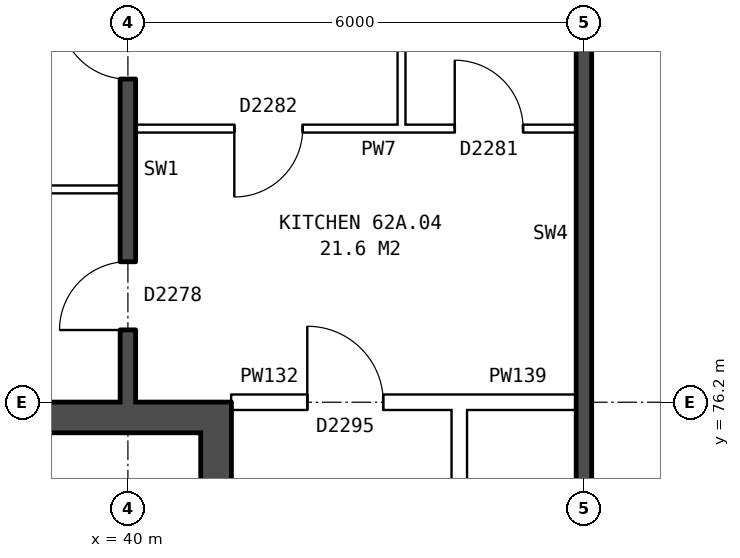
"""IFC4 building model, lengths in metres.
Left out: names, types, materials, properties, quantities, classifications, styles, units other than length and angle.
Written with IfcOpenShell. Run it as: python <this file> out.ifc"""

import sys

from ifc_helpers import new_model, si_unit, direction, frame, frame_2d, origin, place, context, subcontext, project, spatial, rectangle, extrude, element, fill, save


model = new_model("IFC4")
c1 = context("Model", 3, precision=1e-05, world=origin(), true_north=direction((0.0, 1.0)))
c2 = subcontext(c1, "Body", "Model", "MODEL_VIEW")
j1 = project(units=[si_unit("LENGTHUNIT", "METRE"), si_unit("PLANEANGLEUNIT", "RADIAN")], contexts=[c1])
p1 = place(None, origin())
s1 = spatial("IfcSite", under=j1, at=p1, CompositionType="ELEMENT")
p2 = place(p1, origin())
s2 = spatial("IfcBuilding", under=s1, at=p2, CompositionType="ELEMENT")
p3 = place(p2, frame((0.0, 0.0, 221.4)))
s3 = spatial("IfcBuildingStorey", under=s2, at=p3, CompositionType="ELEMENT", Elevation=221.4)
p4 = place(p3, frame((41.16, 76.2, 0.0), z_axis=(0.0, 0.0, 1.0), x_axis=(0.0, -1.0, 0.0)))
e1 = element("IfcWall", 1, at=p4, inside=s3, PredefinedType="SHEAR", context=c2, shape_type="SweptSolid", body=[
    extrude(rectangle(XDim=12.4, YDim=0.4, at=frame_2d((6.2, 0.0))), origin(), (0.0, 0.0, 1.0), 2.85),
])
p5 = place(p4, frame((1.325, 0.0, 0.0)))
e2 = element("IfcOpeningElement", 2, at=p5, cuts=e1, PredefinedType="OPENING", context=c2, shape_type="SweptSolid", body=[
    extrude(rectangle(XDim=1.1, YDim=2.1, at=frame_2d((0.55, 1.05))), frame((0.0, 0.21, 0.0), z_axis=(0.0, -1.0, 0.0), x_axis=(1.0, 0.0, 0.0)), (0.0, 0.0, 1.0), 0.42),
])
p6 = place(p4, frame((5.925, 0.0, 0.0)))
e3 = element("IfcOpeningElement", 3, at=p6, cuts=e1, PredefinedType="OPENING", context=c2, shape_type="SweptSolid", body=[
    extrude(rectangle(XDim=0.85, YDim=2.1, at=frame_2d((0.425, 1.05))), frame((0.0, 0.21, 0.0), z_axis=(0.0, -1.0, 0.0), x_axis=(1.0, 0.0, 0.0)), (0.0, 0.0, 1.0), 0.42),
])
p7 = place(p4, frame((9.9, 0.0, 0.0)))
e4 = element("IfcOpeningElement", 4, at=p7, cuts=e1, PredefinedType="OPENING", context=c2, shape_type="SweptSolid", body=[
    extrude(rectangle(XDim=1.1, YDim=2.1, at=frame_2d((0.55, 1.05))), frame((0.0, 0.21, 0.0), z_axis=(0.0, -1.0, 0.0), x_axis=(1.0, 0.0, 0.0)), (0.0, 0.0, 1.0), 0.42),
])
p8 = place(p3, frame((40.96, 76.0, 0.0), z_axis=(0.0, 0.0, 1.0), x_axis=(-1.0, 0.0, 0.0)))
e5 = element("IfcWall", 5, at=p8, inside=s3, PredefinedType="SHEAR", context=c2, shape_type="SweptSolid", body=[
    extrude(rectangle(XDim=8.2, YDim=0.4, at=frame_2d((4.1, 0.0))), origin(), (0.0, 0.0, 1.0), 2.85),
])
p9 = place(p3, frame((44.36, 63.9, 0.0), z_axis=(0.0, 0.0, 1.0), x_axis=(0.0, 1.0, 0.0)))
e6 = element("IfcWall", 6, at=p9, inside=s3, PredefinedType="PARTITIONING", context=c2, shape_type="SweptSolid", body=[
    extrude(rectangle(XDim=12.2, YDim=0.2, at=frame_2d((6.1, 0.0))), origin(), (0.0, 0.0, 1.0), 2.85),
])
p10 = place(p9, frame((5.1, 0.0, 0.0)))
e7 = element("IfcOpeningElement", 7, at=p10, cuts=e6, PredefinedType="OPENING", context=c2, shape_type="SweptSolid", body=[
    extrude(rectangle(XDim=2.0, YDim=2.1, at=frame_2d((1.0, 1.05))), frame((0.0, 0.11, 0.0), z_axis=(0.0, -1.0, 0.0), x_axis=(1.0, 0.0, 0.0)), (0.0, 0.0, 1.0), 0.22),
])
p11 = place(p3, frame((41.36, 76.2, 0.0), z_axis=(0.0, 0.0, 1.0), x_axis=(1.0, 0.0, 0.0)))
e8 = element("IfcWall", 8, at=p11, inside=s3, PredefinedType="PARTITIONING", context=c2, shape_type="SweptSolid", body=[
    extrude(rectangle(XDim=3.0, YDim=0.2, at=frame_2d((1.5, 0.0))), origin(), (0.0, 0.0, 1.0), 2.85),
])
p12 = place(p11, frame((1.0, 0.0, 0.0)))
e9 = element("IfcOpeningElement", 9, at=p12, cuts=e8, PredefinedType="OPENING", context=c2, shape_type="SweptSolid", body=[
    extrude(rectangle(XDim=1.0, YDim=2.1, at=frame_2d((0.5, 1.05))), frame((0.0, 0.11, 0.0), z_axis=(0.0, -1.0, 0.0), x_axis=(1.0, 0.0, 0.0)), (0.0, 0.0, 1.0), 0.22),
])
p13 = place(p3, frame((44.36, 76.2, 0.0), z_axis=(0.0, 0.0, 1.0), x_axis=(1.0, 0.0, 0.0)))
e10 = element("IfcWall", 10, at=p13, inside=s3, PredefinedType="PARTITIONING", context=c2, shape_type="SweptSolid", body=[
    extrude(rectangle(XDim=1.54, YDim=0.2, at=frame_2d((0.77, 0.0))), origin(), (0.0, 0.0, 1.0), 2.85),
])
p14 = place(p3, frame((32.36, 79.0, 0.0), z_axis=(0.0, 0.0, 1.0), x_axis=(1.0, 0.0, 0.0)))
e11 = element("IfcWall", 11, at=p14, inside=s3, PredefinedType="PARTITIONING", context=c2, shape_type="SweptSolid", body=[
    extrude(rectangle(XDim=7.54, YDim=0.1, at=frame_2d((3.77, 0.0))), origin(), (0.0, 0.0, 1.0), 2.85),
])
p15 = place(p3, frame((40.1, 79.8, 0.0), z_axis=(0.0, 0.0, 1.0), x_axis=(1.0, 0.0, 0.0)))
e12 = element("IfcWall", 12, at=p15, inside=s3, PredefinedType="PARTITIONING", context=c2, shape_type="SweptSolid", body=[
    extrude(rectangle(XDim=5.8, YDim=0.1, at=frame_2d((2.9, 0.0))), origin(), (0.0, 0.0, 1.0), 2.85),
])
p16 = place(p15, frame((1.3, 0.0, 0.0)))
e13 = element("IfcOpeningElement", 13, at=p16, cuts=e12, PredefinedType="OPENING", context=c2, shape_type="SweptSolid", body=[
    extrude(rectangle(XDim=0.9, YDim=2.1, at=frame_2d((0.45, 1.05))), frame((0.0, 0.06, 0.0), z_axis=(0.0, -1.0, 0.0), x_axis=(1.0, 0.0, 0.0)), (0.0, 0.0, 1.0), 0.12),
])
p17 = place(p15, frame((4.2, 0.0, 0.0)))
e14 = element("IfcOpeningElement", 14, at=p17, cuts=e12, PredefinedType="OPENING", context=c2, shape_type="SweptSolid", body=[
    extrude(rectangle(XDim=0.9, YDim=2.1, at=frame_2d((0.45, 1.05))), frame((0.0, 0.06, 0.0), z_axis=(0.0, -1.0, 0.0), x_axis=(1.0, 0.0, 0.0)), (0.0, 0.0, 1.0), 0.12),
])
p18 = place(p3, frame((40.0, 76.2, 0.0), z_axis=(0.0, 0.0, 1.0), x_axis=(0.0, 1.0, 0.0)))
e15 = element("IfcWall", 15, at=p18, inside=s3, PredefinedType="SOLIDWALL", context=c2, shape_type="SweptSolid", body=[
    extrude(rectangle(XDim=9.44, YDim=0.2, at=frame_2d((4.72, 0.0))), origin(), (0.0, 0.0, 1.0), 2.85),
])
p19 = place(p18, frame((7.17, 0.0, 0.0)))
e16 = element("IfcOpeningElement", 16, at=p19, cuts=e15, PredefinedType="OPENING", context=c2, shape_type="SweptSolid", body=[
    extrude(rectangle(XDim=0.9, YDim=2.1, at=frame_2d((0.45, 1.05))), frame((0.0, 0.11, 0.0), z_axis=(0.0, -1.0, 0.0), x_axis=(1.0, 0.0, 0.0)), (0.0, 0.0, 1.0), 0.22),
])
p20 = place(p18, frame((4.25, 0.0, 0.0)))
e17 = element("IfcOpeningElement", 17, at=p20, cuts=e15, PredefinedType="OPENING", context=c2, shape_type="SweptSolid", body=[
    extrude(rectangle(XDim=0.9, YDim=2.1, at=frame_2d((0.45, 1.05))), frame((0.0, 0.11, 0.0), z_axis=(0.0, -1.0, 0.0), x_axis=(1.0, 0.0, 0.0)), (0.0, 0.0, 1.0), 0.22),
])
p21 = place(p18, frame((0.95, 0.0, 0.0)))
e18 = element("IfcOpeningElement", 18, at=p21, cuts=e15, PredefinedType="OPENING", context=c2, shape_type="SweptSolid", body=[
    extrude(rectangle(XDim=0.9, YDim=2.1, at=frame_2d((0.45, 1.05))), frame((0.0, 0.11, 0.0), z_axis=(0.0, -1.0, 0.0), x_axis=(1.0, 0.0, 0.0)), (0.0, 0.0, 1.0), 0.22),
])
p22 = place(p3, frame((43.6, 79.85, 0.0), z_axis=(0.0, 0.0, 1.0), x_axis=(0.0, 1.0, 0.0)))
e19 = element("IfcWall", 19, at=p22, inside=s3, PredefinedType="PARTITIONING", context=c2, shape_type="SweptSolid", body=[
    extrude(rectangle(XDim=2.3, YDim=0.1, at=frame_2d((1.15, 0.0))), origin(), (0.0, 0.0, 1.0), 2.85),
])
p23 = place(p3, frame((46.0, 71.2, 0.0), z_axis=(0.0, 0.0, 1.0), x_axis=(0.0, 1.0, 0.0)))
e20 = element("IfcWall", 20, at=p23, inside=s3, PredefinedType="SOLIDWALL", context=c2, shape_type="SweptSolid", body=[
    extrude(rectangle(XDim=14.44, YDim=0.2, at=frame_2d((7.22, 0.0))), origin(), (0.0, 0.0, 1.0), 2.85),
])
p24 = place(p20, origin())
e21 = element("IfcDoor", 21, at=p24, inside=s3, OperationType="SINGLE_SWING_RIGHT", PredefinedType="DOOR", context=c2, shape_type="SweptSolid", body=[
    extrude(rectangle(XDim=0.9, YDim=2.1, at=frame_2d((0.45, 1.05))), frame((0.0, 0.025, 0.0), z_axis=(0.0, -1.0, 0.0), x_axis=(1.0, 0.0, 0.0)), (0.0, 0.0, 1.0), 0.05),
])
fill(e17, e21)
p25 = place(p21, origin())
e22 = element("IfcDoor", 22, at=p25, inside=s3, OperationType="SINGLE_SWING_LEFT", PredefinedType="DOOR", context=c2, shape_type="SweptSolid", body=[
    extrude(rectangle(XDim=0.9, YDim=2.1, at=frame_2d((0.45, 1.05))), frame((0.0, 0.025, 0.0), z_axis=(0.0, -1.0, 0.0), x_axis=(1.0, 0.0, 0.0)), (0.0, 0.0, 1.0), 0.05),
])
fill(e18, e22)
p26 = place(p12, origin())
e23 = element("IfcDoor", 23, at=p26, inside=s3, OperationType="SINGLE_SWING_LEFT", PredefinedType="DOOR", context=c2, shape_type="SweptSolid", body=[
    extrude(rectangle(XDim=1.0, YDim=2.1, at=frame_2d((0.5, 1.05))), frame((0.0, 0.025, 0.0), z_axis=(0.0, -1.0, 0.0), x_axis=(1.0, 0.0, 0.0)), (0.0, 0.0, 1.0), 0.05),
])
fill(e9, e23)
p27 = place(p16, frame((0.9, 0.0, 0.0), z_axis=(0.0, 0.0, 1.0), x_axis=(-1.0, 0.0, 0.0)))
e24 = element("IfcDoor", 24, at=p27, inside=s3, OperationType="SINGLE_SWING_RIGHT", PredefinedType="DOOR", context=c2, shape_type="SweptSolid", body=[
    extrude(rectangle(XDim=0.9, YDim=2.1, at=frame_2d((0.45, 1.05))), frame((0.0, 0.025, 0.0), z_axis=(0.0, -1.0, 0.0), x_axis=(1.0, 0.0, 0.0)), (0.0, 0.0, 1.0), 0.05),
])
fill(e13, e24)
p28 = place(p17, origin())
e25 = element("IfcDoor", 25, at=p28, inside=s3, OperationType="SINGLE_SWING_LEFT", PredefinedType="DOOR", context=c2, shape_type="SweptSolid", body=[
    extrude(rectangle(XDim=0.9, YDim=2.1, at=frame_2d((0.45, 1.05))), frame((0.0, 0.025, 0.0), z_axis=(0.0, -1.0, 0.0), x_axis=(1.0, 0.0, 0.0)), (0.0, 0.0, 1.0), 0.05),
])
fill(e14, e25)
save(model, sys.argv[1])
